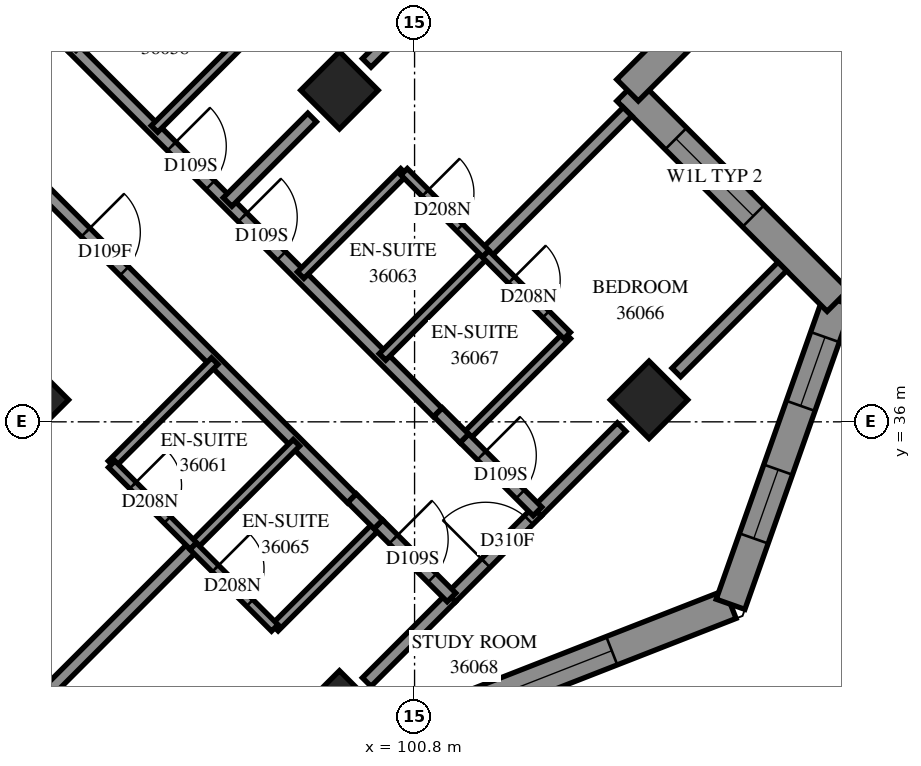
"""IFC4 building model, lengths in metres.
Left out: names, types, materials, properties, quantities, classifications, styles, units other than length and angle.
Written with IfcOpenShell. Run it as: python <this file> out.ifc"""

import sys

from ifc_helpers import new_model, si_unit, direction, frame, frame_2d, origin, origin_2d, place, context, subcontext, project, spatial, polyline, rectangle, outline, extrude, element, fill, save


model = new_model("IFC4")
c1 = context("Model", 3, precision=1e-05, world=origin(), true_north=direction((0.0, 1.0)))
c2 = subcontext(c1, "Body", "Model", "MODEL_VIEW")
j1 = project(units=[si_unit("LENGTHUNIT", "METRE"), si_unit("PLANEANGLEUNIT", "RADIAN")], contexts=[c1])
p1 = place(None, origin())
s1 = spatial("IfcSite", under=j1, at=p1, CompositionType="ELEMENT")
p2 = place(p1, origin())
s2 = spatial("IfcBuilding", under=s1, at=p2, CompositionType="ELEMENT")
p3 = place(p2, frame((0.0, 0.0, 135.4)))
s3 = spatial("IfcBuildingStorey", under=s2, at=p3, CompositionType="ELEMENT", Elevation=135.4)
for number, where, z_axis, x_axis in (
    (1, (99.565, 41.453, 0.0), (0.0, 0.0, 1.0), (0.707, -0.707, 0.0)),
    (2, (94.474, 36.362, 0.0), (0.0, 0.0, 1.0), (0.707, -0.707, 0.0)),
    (3, (104.656, 36.362, 0.0), (0.0, 0.0, 1.0), (0.707, -0.707, 0.0)),
    (4, (99.565, 31.271, 0.0), (0.0, 0.0, 1.0), (0.707, -0.707, 0.0)),
):
    element("IfcColumn", number, at=place(p3, frame(where, z_axis=z_axis, x_axis=x_axis)), inside=s3, PredefinedType="COLUMN", context=c2, shape_type="SweptSolid", body=[
        extrude(rectangle(XDim=0.9, YDim=0.9, at=origin_2d()), origin(), (0.0, 0.0, 1.0), 3.1),
    ])
p4 = place(p3, frame((87.049, 38.695, -0.3), z_axis=(0.0, 0.0, 1.0), x_axis=(0.7071067812, 0.7071067812, 0.0)))
e5 = element("IfcWall", 5, at=p4, inside=s3, PredefinedType="SHEAR", context=c2, shape_type="SweptSolid", body=[
    extrude(rectangle(XDim=14.4, YDim=0.6, at=frame_2d((7.2, 0.0))), origin(), (0.0, 0.0, 1.0), 2.7),
])
p5 = place(p4, frame((4.55, 0.0, 0.3)))
e6 = element("IfcOpeningElement", 6, at=p5, cuts=e5, PredefinedType="OPENING", context=c2, shape_type="SweptSolid", body=[
    extrude(rectangle(XDim=1.1, YDim=2.1, at=frame_2d((0.55, 1.05))), frame((0.0, 0.31, 0.0), z_axis=(0.0, -1.0, 0.0), x_axis=(1.0, 0.0, 0.0)), (0.0, 0.0, 1.0), 0.62),
])
p6 = place(p4, frame((11.35, 0.0, 0.3)))
e7 = element("IfcOpeningElement", 7, at=p6, cuts=e5, PredefinedType="OPENING", context=c2, shape_type="SweptSolid", body=[
    extrude(rectangle(XDim=1.1, YDim=2.1, at=frame_2d((0.55, 1.05))), frame((0.0, 0.31, 0.0), z_axis=(0.0, -1.0, 0.0), x_axis=(1.0, 0.0, 0.0)), (0.0, 0.0, 1.0), 0.62),
])
p7 = place(p3, frame((100.892, 31.004, 0.0), z_axis=(0.0, 0.0, 1.0), x_axis=(0.9313377775, 0.364156483, 0.0)))
e8 = element("IfcWall", 8, at=p7, inside=s3, PredefinedType="SOLIDWALL", context=c2, shape_type="SweptSolid", body=[
    extrude(outline(polyline([(0.11, -0.25), (5.595, -0.25), (5.366, 0.25), (-0.11, 0.25), (0.11, -0.25)])), origin(), (0.0, 0.0, 1.0), 3.1),
])
p8 = place(p7, frame((0.583, 0.0, 0.45)))
e9 = element("IfcOpeningElement", 9, at=p8, cuts=e8, PredefinedType="OPENING", context=c2, shape_type="SweptSolid", body=[
    extrude(rectangle(XDim=2.8, YDim=2.5, at=frame_2d((1.4, 1.25))), frame((0.0, 0.26, 0.0), z_axis=(0.0, -1.0, 0.0), x_axis=(1.0, 0.0, 0.0)), (0.0, 0.0, 1.0), 0.52),
])
p9 = place(p3, frame((105.996, 33.0, 0.0), z_axis=(0.0, 0.0, 1.0), x_axis=(0.3333039777, 0.9428194199, 0.0)))
e10 = element("IfcWall", 10, at=p9, inside=s3, PredefinedType="SOLIDWALL", context=c2, shape_type="SweptSolid", body=[
    extrude(outline(polyline([(-0.114, -0.25), (5.454, -0.25), (5.139, 0.25), (0.114, 0.25), (-0.114, -0.25)])), origin(), (0.0, 0.0, 1.0), 3.1),
])
p10 = place(p9, frame((1.148, 0.0, 0.45)))
e11 = element("IfcOpeningElement", 11, at=p10, cuts=e10, PredefinedType="OPENING", context=c2, shape_type="SweptSolid", body=[
    extrude(rectangle(XDim=1.2, YDim=2.5, at=frame_2d((0.6, 1.25))), frame((0.0, 0.26, 0.0), z_axis=(0.0, -1.0, 0.0), x_axis=(1.0, 0.0, 0.0)), (0.0, 0.0, 1.0), 0.52),
])
p11 = place(p9, frame((3.461, 0.0, 0.45)))
e12 = element("IfcOpeningElement", 12, at=p11, cuts=e10, PredefinedType="OPENING", context=c2, shape_type="SweptSolid", body=[
    extrude(rectangle(XDim=1.2, YDim=2.5, at=frame_2d((0.6, 1.25))), frame((0.0, 0.26, 0.0), z_axis=(0.0, -1.0, 0.0), x_axis=(1.0, 0.0, 0.0)), (0.0, 0.0, 1.0), 0.52),
])
p12 = place(p3, frame((107.762, 37.994, 0.0), z_axis=(0.0, 0.0, 1.0), x_axis=(-0.707117001, 0.7070965612, 0.0)))
e13 = element("IfcWall", 13, at=p12, inside=s3, PredefinedType="SOLIDWALL", context=c2, shape_type="SweptSolid", body=[
    extrude(outline(polyline([(-0.158, -0.25), (4.642, -0.25), (5.142, 0.25), (0.158, 0.25), (-0.158, -0.25)])), origin(), (0.0, 0.0, 1.0), 3.1),
])
p13 = place(p12, frame((1.967, 0.0, 0.6)))
e14 = element("IfcOpeningElement", 14, at=p13, cuts=e13, PredefinedType="OPENING", context=c2, shape_type="SweptSolid", body=[
    extrude(rectangle(XDim=1.8, YDim=1.9, at=frame_2d((0.9, 0.95))), frame((0.0, 0.26, 0.0), z_axis=(0.0, -1.0, 0.0), x_axis=(1.0, 0.0, 0.0)), (0.0, 0.0, 1.0), 0.52),
])
p14 = place(p3, frame((104.302, 41.453, 0.0), z_axis=(0.0, 0.0, 1.0), x_axis=(0.70712456, 0.707089002, 0.0)))
e15 = element("IfcWall", 15, at=p14, inside=s3, PredefinedType="SOLIDWALL", context=c2, shape_type="SweptSolid", body=[
    extrude(outline(polyline([(0.25, -0.25), (5.95, -0.25), (5.299, 0.25), (-0.25, 0.25), (0.25, -0.25)])), origin(), (0.0, 0.0, 1.0), 3.1),
])
p15 = place(p14, frame((1.125, 0.0, 0.6)))
e16 = element("IfcOpeningElement", 16, at=p15, cuts=e15, PredefinedType="OPENING", context=c2, shape_type="SweptSolid", body=[
    extrude(rectangle(XDim=1.8, YDim=1.9, at=frame_2d((0.9, 0.95))), frame((0.0, 0.26, 0.0), z_axis=(0.0, -1.0, 0.0), x_axis=(1.0, 0.0, 0.0)), (0.0, 0.0, 1.0), 0.52),
])
p16 = place(p3, frame((93.127, 41.379, 0.0), z_axis=(0.0, 0.0, 1.0), x_axis=(0.7071067812, -0.7071067812, 0.0)))
e17 = element("IfcWall", 17, at=p16, inside=s3, PredefinedType="PARTITIONING", context=c2, shape_type="SweptSolid", body=[
    extrude(rectangle(XDim=9.39, YDim=0.2, at=frame_2d((4.695, 0.0))), origin(), (0.0, 0.0, 1.0), 3.1),
])
p17 = place(p16, frame((3.2, 0.0, 0.0)))
e18 = element("IfcOpeningElement", 18, at=p17, cuts=e17, PredefinedType="OPENING", context=c2, shape_type="SweptSolid", body=[
    extrude(rectangle(XDim=0.9, YDim=2.1, at=frame_2d((0.45, 1.05))), frame((0.0, 0.11, 0.0), z_axis=(0.0, -1.0, 0.0), x_axis=(1.0, 0.0, 0.0)), (0.0, 0.0, 1.0), 0.22),
])
p18 = place(p3, frame((95.177, 42.157, 0.0), z_axis=(0.0, 0.0, 1.0), x_axis=(0.7071067812, -0.7071067812, 0.0)))
e19 = element("IfcWall", 19, at=p18, inside=s3, PredefinedType="PARTITIONING", context=c2, shape_type="SweptSolid", body=[
    extrude(rectangle(XDim=8.491, YDim=0.2, at=frame_2d((4.245, 0.0))), origin(), (0.0, 0.0, 1.0), 3.1),
])
p19 = place(p18, frame((2.3, 0.0, 0.0)))
e20 = element("IfcOpeningElement", 20, at=p19, cuts=e19, PredefinedType="OPENING", context=c2, shape_type="SweptSolid", body=[
    extrude(rectangle(XDim=0.9, YDim=2.1, at=frame_2d((0.45, 1.05))), frame((0.0, 0.11, 0.0), z_axis=(0.0, -1.0, 0.0), x_axis=(1.0, 0.0, 0.0)), (0.0, 0.0, 1.0), 0.22),
])
p20 = place(p18, frame((3.95, 0.0, 0.0)))
e21 = element("IfcOpeningElement", 21, at=p20, cuts=e19, PredefinedType="OPENING", context=c2, shape_type="SweptSolid", body=[
    extrude(rectangle(XDim=0.9, YDim=2.1, at=frame_2d((0.45, 1.05))), frame((0.0, 0.11, 0.0), z_axis=(0.0, -1.0, 0.0), x_axis=(1.0, 0.0, 0.0)), (0.0, 0.0, 1.0), 0.22),
])
p21 = place(p3, frame((91.398, 28.19, 0.0), z_axis=(0.0, 0.0, 1.0), x_axis=(0.7072294342, 0.7069841069, 0.0)))
e22 = element("IfcWall", 22, at=p21, inside=s3, PredefinedType="PARTITIONING", context=c2, shape_type="SweptSolid", body=[
    extrude(rectangle(XDim=8.152, YDim=0.2, at=frame_2d((4.076, 0.0))), origin(), (0.0, 0.0, 1.0), 3.1),
])
p22 = place(p3, frame((100.013, 41.903, 0.0), z_axis=(0.0, 0.0, 1.0), x_axis=(0.7071067812, 0.7071067812, 0.0)))
e23 = element("IfcWall", 23, at=p22, inside=s3, PredefinedType="PARTITIONING", context=c2, shape_type="SweptSolid", body=[
    extrude(rectangle(XDim=5.928, YDim=0.2, at=frame_2d((2.964, 0.0))), origin(), (0.0, 0.0, 1.0), 3.1),
])
p23 = place(p3, frame((101.968, 38.766, 0.0), z_axis=(0.0, 0.0, 1.0), x_axis=(0.7071067812, 0.7071067812, 0.0)))
e24 = element("IfcWall", 24, at=p23, inside=s3, PredefinedType="PARTITIONING", context=c2, shape_type="SweptSolid", body=[
    extrude(rectangle(XDim=3.3, YDim=0.2, at=frame_2d((1.65, 0.0))), origin(), (0.0, 0.0, 1.0), 3.1),
])
p24 = place(p3, frame((105.105, 36.813, 0.0), z_axis=(0.0, 0.0, 1.0), x_axis=(0.7071067812, 0.7071067812, 0.0)))
e25 = element("IfcWall", 25, at=p24, inside=s3, PredefinedType="PARTITIONING", context=c2, shape_type="SweptSolid", body=[
    extrude(rectangle(XDim=2.463, YDim=0.2, at=frame_2d((1.232, 0.0))), origin(), (0.0, 0.0, 1.0), 3.1),
])
for number, where, z_axis, x_axis in (
    (26, (96.523, 40.817, 0.0), (0.0, 0.0, 1.0), (0.707, 0.707, 0.0)),
    (27, (98.927, 38.413, 0.0), (0.0, 0.0, 1.0), (0.707, 0.707, 0.0)),
    (28, (98.503, 32.615, 0.0), (0.0, 0.0, 1.0), (0.707, 0.707, 0.0)),
):
    element("IfcWall", number, at=place(p3, frame(where, z_axis=z_axis, x_axis=x_axis)), inside=s3, PredefinedType="PARTITIONING", context=c2, shape_type="SweptSolid", body=[
        extrude(rectangle(XDim=2.401, YDim=0.15, at=frame_2d((1.201, 0.0))), origin(), (0.0, 0.0, 1.0), 3.1),
    ])
p25 = place(p3, frame((100.273, 37.067, 0.0), z_axis=(0.0, 0.0, 1.0), x_axis=(0.706689978, 0.7075233388, 0.0)))
e29 = element("IfcWall", 29, at=p25, inside=s3, PredefinedType="PARTITIONING", context=c2, shape_type="SweptSolid", body=[
    extrude(rectangle(XDim=2.4, YDim=0.15, at=frame_2d((1.2, 0.0))), origin(), (0.0, 0.0, 1.0), 3.1),
])
for number, where, z_axis, x_axis in (
    (30, (97.161, 33.959, 0.0), (0.0, 0.0, 1.0), (0.707, 0.707, 0.0)),
    (31, (95.817, 35.303, 0.0), (0.0, 0.0, 1.0), (0.707, 0.707, 0.0)),
    (32, (101.615, 35.727, 0.0), (0.0, 0.0, 1.0), (0.707, 0.707, 0.0)),
):
    element("IfcWall", number, at=place(p3, frame(where, z_axis=z_axis, x_axis=x_axis)), inside=s3, PredefinedType="PARTITIONING", context=c2, shape_type="SweptSolid", body=[
        extrude(rectangle(XDim=2.398, YDim=0.15, at=frame_2d((1.199, 0.0))), origin(), (0.0, 0.0, 1.0), 3.1),
    ])
p26 = place(p3, frame((101.403, 33.111, 0.0), z_axis=(0.0, 0.0, 1.0), x_axis=(0.7071067812, 0.7071067812, 0.0)))
e33 = element("IfcWall", 33, at=p26, inside=s3, PredefinedType="PARTITIONING", context=c2, shape_type="SweptSolid", body=[
    extrude(rectangle(XDim=2.0, YDim=0.2, at=frame_2d((1.0, 0.0))), origin(), (0.0, 0.0, 1.0), 2.6),
])
p27 = place(p26, frame((0.802, 0.0, 0.0)))
e34 = element("IfcOpeningElement", 34, at=p27, cuts=e33, PredefinedType="OPENING", context=c2, shape_type="SweptSolid", body=[
    extrude(rectangle(XDim=1.0, YDim=2.1, at=frame_2d((0.5, 1.05))), frame((0.0, 0.11, 0.0), z_axis=(0.0, -1.0, 0.0), x_axis=(1.0, 0.0, 0.0)), (0.0, 0.0, 1.0), 0.22),
])
p28 = place(p3, frame((100.013, 31.721, 0.0), z_axis=(0.0, 0.0, 1.0), x_axis=(0.7071067812, 0.7071067812, 0.0)))
e35 = element("IfcWall", 35, at=p28, inside=s3, PredefinedType="PARTITIONING", context=c2, shape_type="SweptSolid", body=[
    extrude(rectangle(XDim=1.966, YDim=0.2, at=frame_2d((0.983, 0.0))), origin(), (0.0, 0.0, 1.0), 2.6),
])
p29 = place(p3, frame((97.725, 39.615, 0.0), z_axis=(0.0, 0.0, 1.0), x_axis=(0.7071067812, 0.7071067812, 0.0)))
e36 = element("IfcWall", 36, at=p29, inside=s3, PredefinedType="PARTITIONING", context=c2, shape_type="SweptSolid", body=[
    extrude(rectangle(XDim=1.966, YDim=0.2, at=frame_2d((0.983, 0.0))), origin(), (0.0, 0.0, 1.0), 3.1),
])
p30 = place(p3, frame((102.817, 34.525, 0.0), z_axis=(0.0, 0.0, 1.0), x_axis=(0.7071067812, 0.7071067812, 0.0)))
e37 = element("IfcWall", 37, at=p30, inside=s3, PredefinedType="PARTITIONING", context=c2, shape_type="SweptSolid", body=[
    extrude(rectangle(XDim=1.963, YDim=0.2, at=frame_2d((0.982, 0.0))), origin(), (0.0, 0.0, 1.0), 2.6),
])
p31 = place(p3, frame((101.965, 38.763, 0.0), z_axis=(0.0, 0.0, 1.0), x_axis=(0.7071067812, -0.7071067812, 0.0)))
e38 = element("IfcWall", 38, at=p31, inside=s3, PredefinedType="PARTITIONING", context=c2, shape_type="SweptSolid", body=[
    extrude(rectangle(XDim=1.901, YDim=0.15, at=frame_2d((0.95, 0.0))), origin(), (0.0, 0.0, 1.0), 3.1),
])
p32 = place(p31, frame((0.608, 0.0, 0.0)))
e39 = element("IfcOpeningElement", 39, at=p32, cuts=e38, PredefinedType="OPENING", context=c2, shape_type="SweptSolid", body=[
    extrude(rectangle(XDim=0.8, YDim=2.1, at=frame_2d((0.4, 1.05))), frame((0.0, 0.085, 0.0), z_axis=(0.0, -1.0, 0.0), x_axis=(1.0, 0.0, 0.0)), (0.0, 0.0, 1.0), 0.17),
])
p33 = place(p3, frame((100.628, 40.112, 0.0), z_axis=(0.0, 0.0, 1.0), x_axis=(0.7065800724, -0.7076330979, 0.0)))
e40 = element("IfcWall", 40, at=p33, inside=s3, PredefinedType="PARTITIONING", context=c2, shape_type="SweptSolid", body=[
    extrude(rectangle(XDim=1.899, YDim=0.15, at=frame_2d((0.95, 0.0))), origin(), (0.0, 0.0, 1.0), 3.1),
])
p34 = place(p33, frame((0.493, 0.0, 0.0)))
e41 = element("IfcOpeningElement", 41, at=p34, cuts=e40, PredefinedType="OPENING", context=c2, shape_type="SweptSolid", body=[
    extrude(rectangle(XDim=0.8, YDim=2.1, at=frame_2d((0.4, 1.05))), frame((0.0, 0.085, 0.0), z_axis=(0.0, -1.0, 0.0), x_axis=(1.0, 0.0, 0.0)), (0.0, 0.0, 1.0), 0.17),
])
p35 = place(p3, frame((95.82, 35.304, 0.0), z_axis=(0.0, 0.0, 1.0), x_axis=(0.7065800724, -0.7076330979, 0.0)))
e42 = element("IfcWall", 42, at=p35, inside=s3, PredefinedType="PARTITIONING", context=c2, shape_type="SweptSolid", body=[
    extrude(rectangle(XDim=1.899, YDim=0.15, at=frame_2d((0.95, 0.0))), origin(), (0.0, 0.0, 1.0), 3.1),
])
p36 = place(p35, frame((0.493, 0.0, 0.0)))
e43 = element("IfcOpeningElement", 43, at=p36, cuts=e42, PredefinedType="OPENING", context=c2, shape_type="SweptSolid", body=[
    extrude(rectangle(XDim=0.8, YDim=2.1, at=frame_2d((0.4, 1.05))), frame((0.0, 0.085, 0.0), z_axis=(0.0, -1.0, 0.0), x_axis=(1.0, 0.0, 0.0)), (0.0, 0.0, 1.0), 0.17),
])
p37 = place(p3, frame((97.159, 33.953, 0.0), z_axis=(0.0, 0.0, 1.0), x_axis=(0.7071067812, -0.7071067812, 0.0)))
e44 = element("IfcWall", 44, at=p37, inside=s3, PredefinedType="PARTITIONING", context=c2, shape_type="SweptSolid", body=[
    extrude(rectangle(XDim=1.898, YDim=0.15, at=frame_2d((0.949, 0.0))), origin(), (0.0, 0.0, 1.0), 3.1),
])
p38 = place(p37, frame((0.517, 0.0, 0.0)))
e45 = element("IfcOpeningElement", 45, at=p38, cuts=e44, PredefinedType="OPENING", context=c2, shape_type="SweptSolid", body=[
    extrude(rectangle(XDim=0.8, YDim=2.1, at=frame_2d((0.4, 1.05))), frame((0.0, 0.085, 0.0), z_axis=(0.0, -1.0, 0.0), x_axis=(1.0, 0.0, 0.0)), (0.0, 0.0, 1.0), 0.17),
])
p39 = place(p3, frame((100.205, 34.315, 0.0), z_axis=(0.0, 0.0, 1.0), x_axis=(0.7071067812, -0.7071067812, 0.0)))
e46 = element("IfcWall", 46, at=p39, inside=s3, PredefinedType="PARTITIONING", context=c2, shape_type="SweptSolid", body=[
    extrude(rectangle(XDim=1.7, YDim=0.2, at=frame_2d((0.85, 0.0))), origin(), (0.0, 0.0, 1.0), 3.1),
])
p40 = place(p39, frame((0.35, 0.0, 0.0)))
e47 = element("IfcOpeningElement", 47, at=p40, cuts=e46, PredefinedType="OPENING", context=c2, shape_type="SweptSolid", body=[
    extrude(rectangle(XDim=0.9, YDim=2.1, at=frame_2d((0.45, 1.05))), frame((0.0, 0.11, 0.0), z_axis=(0.0, -1.0, 0.0), x_axis=(1.0, 0.0, 0.0)), (0.0, 0.0, 1.0), 0.22),
])
p41 = place(p3, frame((101.619, 35.729, 0.0), z_axis=(0.0, 0.0, 1.0), x_axis=(0.7071067812, -0.7071067812, 0.0)))
e48 = element("IfcWall", 48, at=p41, inside=s3, PredefinedType="PARTITIONING", context=c2, shape_type="SweptSolid", body=[
    extrude(rectangle(XDim=1.7, YDim=0.2, at=frame_2d((0.85, 0.0))), origin(), (0.0, 0.0, 1.0), 3.1),
])
p42 = place(p41, frame((0.4, 0.0, 0.0)))
e49 = element("IfcOpeningElement", 49, at=p42, cuts=e48, PredefinedType="OPENING", context=c2, shape_type="SweptSolid", body=[
    extrude(rectangle(XDim=0.9, YDim=2.1, at=frame_2d((0.45, 1.05))), frame((0.0, 0.11, 0.0), z_axis=(0.0, -1.0, 0.0), x_axis=(1.0, 0.0, 0.0)), (0.0, 0.0, 1.0), 0.22),
])
for number, where, z_axis, x_axis in (
    (50, (101.186, 36.158, 0.0), (0.0, 0.0, 1.0), (0.709, -0.705, 0.0)),
    (51, (99.772, 34.744, 0.0), (0.0, 0.0, 1.0), (0.709, -0.705, 0.0)),
):
    element("IfcWall", number, at=place(p3, frame(where, z_axis=z_axis, x_axis=x_axis)), inside=s3, PredefinedType="PARTITIONING", context=c2, shape_type="SweptSolid", body=[
        extrude(rectangle(XDim=0.61, YDim=0.2, at=frame_2d((0.305, 0.0))), origin(), (0.0, 0.0, 1.0), 3.1),
    ])
p43 = place(p8, origin())
e52 = element("IfcWindow", 52, at=p43, inside=s3, PartitioningType="SINGLE_PANEL", PredefinedType="WINDOW", context=c2, shape_type="SweptSolid", body=[
    extrude(rectangle(XDim=2.8, YDim=2.5, at=frame_2d((1.4, 1.25))), frame((0.0, 0.18, 0.0), z_axis=(0.0, -1.0, 0.0), x_axis=(1.0, 0.0, 0.0)), (0.0, 0.0, 1.0), 0.06),
])
fill(e9, e52)
p44 = place(p10, origin())
e53 = element("IfcWindow", 53, at=p44, inside=s3, PartitioningType="SINGLE_PANEL", PredefinedType="WINDOW", context=c2, shape_type="SweptSolid", body=[
    extrude(rectangle(XDim=1.2, YDim=2.5, at=frame_2d((0.6, 1.25))), frame((0.0, 0.18, 0.0), z_axis=(0.0, -1.0, 0.0), x_axis=(1.0, 0.0, 0.0)), (0.0, 0.0, 1.0), 0.06),
])
fill(e11, e53)
p45 = place(p11, origin())
e54 = element("IfcWindow", 54, at=p45, inside=s3, PartitioningType="SINGLE_PANEL", PredefinedType="WINDOW", context=c2, shape_type="SweptSolid", body=[
    extrude(rectangle(XDim=1.2, YDim=2.5, at=frame_2d((0.6, 1.25))), frame((0.0, 0.18, 0.0), z_axis=(0.0, -1.0, 0.0), x_axis=(1.0, 0.0, 0.0)), (0.0, 0.0, 1.0), 0.06),
])
fill(e12, e54)
p46 = place(p13, origin())
e55 = element("IfcWindow", 55, at=p46, inside=s3, PartitioningType="SINGLE_PANEL", PredefinedType="WINDOW", context=c2, shape_type="SweptSolid", body=[
    extrude(rectangle(XDim=1.8, YDim=1.9, at=frame_2d((0.9, 0.95))), frame((0.0, 0.18, 0.0), z_axis=(0.0, -1.0, 0.0), x_axis=(1.0, 0.0, 0.0)), (0.0, 0.0, 1.0), 0.06),
])
fill(e14, e55)
p47 = place(p19, origin())
e56 = element("IfcDoor", 56, at=p47, inside=s3, OperationType="SINGLE_SWING_RIGHT", PredefinedType="DOOR", context=c2, shape_type="SweptSolid", body=[
    extrude(rectangle(XDim=0.9, YDim=2.1, at=frame_2d((0.45, 1.05))), frame((0.0, 0.025, 0.0), z_axis=(0.0, -1.0, 0.0), x_axis=(1.0, 0.0, 0.0)), (0.0, 0.0, 1.0), 0.05),
])
fill(e20, e56)
p48 = place(p17, origin())
e57 = element("IfcDoor", 57, at=p48, inside=s3, OperationType="SINGLE_SWING_LEFT", PredefinedType="DOOR", context=c2, shape_type="SweptSolid", body=[
    extrude(rectangle(XDim=0.9, YDim=2.1, at=frame_2d((0.45, 1.05))), frame((0.0, 0.025, 0.0), z_axis=(0.0, -1.0, 0.0), x_axis=(1.0, 0.0, 0.0)), (0.0, 0.0, 1.0), 0.05),
])
fill(e18, e57)
p49 = place(p36, origin())
e58 = element("IfcDoor", 58, at=p49, inside=s3, OperationType="SINGLE_SWING_RIGHT", PredefinedType="DOOR", context=c2, shape_type="SweptSolid", body=[
    extrude(rectangle(XDim=0.8, YDim=2.1, at=frame_2d((0.4, 1.05))), frame((0.0, 0.025, 0.0), z_axis=(0.0, -1.0, 0.0), x_axis=(1.0, 0.0, 0.0)), (0.0, 0.0, 1.0), 0.05),
])
fill(e43, e58)
p50 = place(p20, origin())
e59 = element("IfcDoor", 59, at=p50, inside=s3, OperationType="SINGLE_SWING_LEFT", PredefinedType="DOOR", context=c2, shape_type="SweptSolid", body=[
    extrude(rectangle(XDim=0.9, YDim=2.1, at=frame_2d((0.45, 1.05))), frame((0.0, 0.025, 0.0), z_axis=(0.0, -1.0, 0.0), x_axis=(1.0, 0.0, 0.0)), (0.0, 0.0, 1.0), 0.05),
])
fill(e21, e59)
p51 = place(p34, origin())
e60 = element("IfcDoor", 60, at=p51, inside=s3, OperationType="SINGLE_SWING_RIGHT", PredefinedType="DOOR", context=c2, shape_type="SweptSolid", body=[
    extrude(rectangle(XDim=0.8, YDim=2.1, at=frame_2d((0.4, 1.05))), frame((0.0, 0.025, 0.0), z_axis=(0.0, -1.0, 0.0), x_axis=(1.0, 0.0, 0.0)), (0.0, 0.0, 1.0), 0.05),
])
fill(e41, e60)
p52 = place(p40, origin())
e61 = element("IfcDoor", 61, at=p52, inside=s3, OperationType="SINGLE_SWING_LEFT", PredefinedType="DOOR", context=c2, shape_type="SweptSolid", body=[
    extrude(rectangle(XDim=0.9, YDim=2.1, at=frame_2d((0.45, 1.05))), frame((0.0, 0.025, 0.0), z_axis=(0.0, -1.0, 0.0), x_axis=(1.0, 0.0, 0.0)), (0.0, 0.0, 1.0), 0.05),
])
fill(e47, e61)
p53 = place(p38, origin())
e62 = element("IfcDoor", 62, at=p53, inside=s3, OperationType="SINGLE_SWING_RIGHT", PredefinedType="DOOR", context=c2, shape_type="SweptSolid", body=[
    extrude(rectangle(XDim=0.8, YDim=2.1, at=frame_2d((0.4, 1.05))), frame((0.0, 0.025, 0.0), z_axis=(0.0, -1.0, 0.0), x_axis=(1.0, 0.0, 0.0)), (0.0, 0.0, 1.0), 0.05),
])
fill(e45, e62)
p54 = place(p42, origin())
e63 = element("IfcDoor", 63, at=p54, inside=s3, OperationType="SINGLE_SWING_RIGHT", PredefinedType="DOOR", context=c2, shape_type="SweptSolid", body=[
    extrude(rectangle(XDim=0.9, YDim=2.1, at=frame_2d((0.45, 1.05))), frame((0.0, 0.025, 0.0), z_axis=(0.0, -1.0, 0.0), x_axis=(1.0, 0.0, 0.0)), (0.0, 0.0, 1.0), 0.05),
])
fill(e49, e63)
p55 = place(p32, origin())
e64 = element("IfcDoor", 64, at=p55, inside=s3, OperationType="SINGLE_SWING_RIGHT", PredefinedType="DOOR", context=c2, shape_type="SweptSolid", body=[
    extrude(rectangle(XDim=0.8, YDim=2.1, at=frame_2d((0.4, 1.05))), frame((0.0, 0.025, 0.0), z_axis=(0.0, -1.0, 0.0), x_axis=(1.0, 0.0, 0.0)), (0.0, 0.0, 1.0), 0.05),
])
fill(e39, e64)
p56 = place(p27, origin())
e65 = element("IfcDoor", 65, at=p56, inside=s3, OperationType="SINGLE_SWING_RIGHT", PredefinedType="DOOR", context=c2, shape_type="SweptSolid", body=[
    extrude(rectangle(XDim=1.0, YDim=2.1, at=frame_2d((0.5, 1.05))), frame((0.0, 0.025, 0.0), z_axis=(0.0, -1.0, 0.0), x_axis=(1.0, 0.0, 0.0)), (0.0, 0.0, 1.0), 0.05),
])
fill(e34, e65)
save(model, sys.argv[1])
